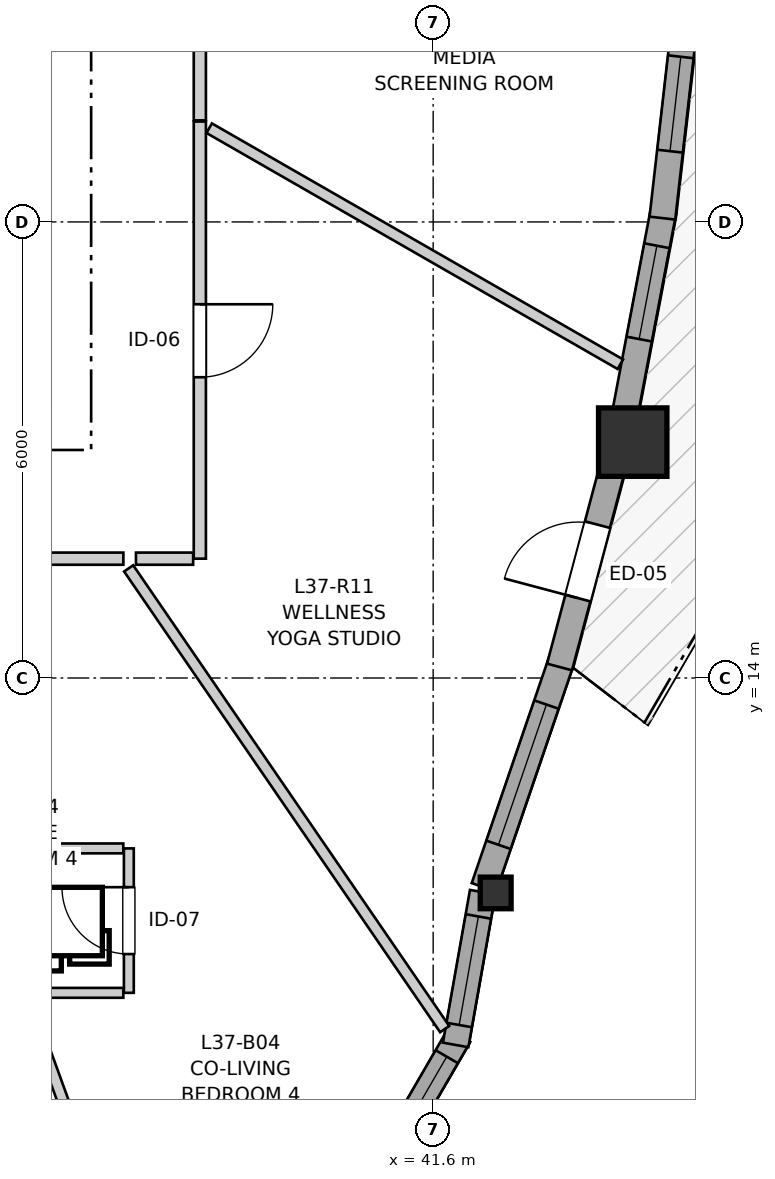
"""IFC4 building model, lengths in metres.
Left out: names, types, materials, properties, quantities, classifications, styles, units other than length and angle.
Written with IfcOpenShell. Run it as: python <this file> out.ifc"""

import sys

from ifc_helpers import new_model, si_unit, direction, frame, frame_2d, origin, origin_2d, place, context, subcontext, project, spatial, rectangle, i_section, extrude, source, transform, mapped, element, fill, save


model = new_model("IFC4")
c1 = context("Model", 3, precision=1e-05, world=origin(), true_north=direction((0.0, 1.0)))
c2 = subcontext(c1, "Body", "Model", "MODEL_VIEW")
j1 = project(units=[si_unit("LENGTHUNIT", "METRE"), si_unit("PLANEANGLEUNIT", "RADIAN")], contexts=[c1])
p1 = place(None, origin())
s1 = spatial("IfcSite", under=j1, at=p1, CompositionType="ELEMENT")
p2 = place(p1, origin())
s2 = spatial("IfcBuilding", under=s1, at=p2, CompositionType="ELEMENT")
p3 = place(p2, frame((0.0, 0.0, 124.8)))
s3 = spatial("IfcBuildingStorey", under=s2, at=p3, CompositionType="ELEMENT", Elevation=124.8)
m1 = source(origin(), c2, "Body", "SweptSolid", [
    extrude(i_section(OverallWidth=0.406, OverallDepth=0.416, WebThickness=0.027, FlangeThickness=0.044, FilletRadius=0.015, at=origin_2d()), origin(), (0.0, 0.0, 1.0), 2.9),
])
p4 = place(p3, frame((42.423, 11.172, 0.0), z_axis=(0.0, 0.0, 1.0), x_axis=(1.0, 0.0, 0.0)))
e1 = element("IfcColumn", 1, at=p4, inside=s3, PredefinedType="PILASTER", context=c2, shape_type="MappedRepresentation", body=[
    mapped(m1, transform((0.0, 0.0, 0.0), x_axis=(1.0, 0.0, 0.0), y_axis=(0.0, 1.0, 0.0), z_axis=(0.0, 0.0, 1.0), scale=1.0)),
])
m2 = source(origin(), c2, "Body", "SweptSolid", [
    extrude(rectangle(XDim=0.9, YDim=0.9, at=origin_2d()), origin(), (0.0, 0.0, 1.0), 2.9),
])
p5 = place(p3, frame((44.226, 17.104, 0.0), z_axis=(0.0, 0.0, 1.0), x_axis=(1.0, 0.0, 0.0)))
e2 = element("IfcColumn", 2, at=p5, inside=s3, PredefinedType="COLUMN", context=c2, shape_type="MappedRepresentation", body=[
    mapped(m2, transform((0.0, 0.0, 0.0), x_axis=(1.0, 0.0, 0.0), y_axis=(0.0, 1.0, 0.0), z_axis=(0.0, 0.0, 1.0), scale=1.0)),
])
p6 = place(p3, frame((40.888, 7.483, 0.0), z_axis=(0.0, 0.0, 1.0), x_axis=(0.501902596059, 0.864924149315, 0.0)))
e3 = element("IfcWall", 3, at=p6, inside=s3, PredefinedType="SOLIDWALL", context=c2, shape_type="SweptSolid", body=[
    extrude(rectangle(XDim=2.099, YDim=0.34, at=frame_2d((1.049, 0.0))), origin(), (0.0, 0.0, 1.0), 2.43),
])
p7 = place(p6, frame((0.324, 0.0, 0.82)))
e4 = element("IfcOpeningElement", 4, at=p7, cuts=e3, PredefinedType="OPENING", context=c2, shape_type="SweptSolid", body=[
    extrude(rectangle(XDim=1.45, YDim=1.25, at=frame_2d((0.725, 0.625))), frame((0.0, 0.18, 0.0), z_axis=(0.0, -1.0, 0.0), x_axis=(1.0, 0.0, 0.0)), (0.0, 0.0, 1.0), 0.36),
])
p8 = place(p3, frame((41.896, 9.173, 0.0), z_axis=(0.0, 0.0, 1.0), x_axis=(0.174399433509, 0.984674990843, 0.0)))
e5 = element("IfcWall", 5, at=p8, inside=s3, PredefinedType="SOLIDWALL", context=c2, shape_type="SweptSolid", body=[
    extrude(rectangle(XDim=2.041, YDim=0.34, at=frame_2d((1.021, 0.0))), origin(), (0.0, 0.0, 1.0), 2.43),
])
p9 = place(p8, frame((0.267, 0.0, 0.82)))
e6 = element("IfcOpeningElement", 6, at=p9, cuts=e5, PredefinedType="OPENING", context=c2, shape_type="SweptSolid", body=[
    extrude(rectangle(XDim=1.45, YDim=1.25, at=frame_2d((0.725, 0.625))), frame((0.0, 0.18, 0.0), z_axis=(0.0, -1.0, 0.0), x_axis=(1.0, 0.0, 0.0)), (0.0, 0.0, 1.0), 0.36),
])
p10 = place(p3, frame((42.268, 11.246, 0.0), z_axis=(0.0, 0.0, 1.0), x_axis=(0.323583674973, 0.946199558915, 0.0)))
e7 = element("IfcWall", 7, at=p10, inside=s3, PredefinedType="SOLIDWALL", context=c2, shape_type="SweptSolid", body=[
    extrude(rectangle(XDim=3.152, YDim=0.34, at=frame_2d((1.576, 0.0))), origin(), (0.0, 0.0, 1.0), 2.43),
])
p11 = place(p10, frame((0.591, 0.0, 0.82)))
e8 = element("IfcOpeningElement", 8, at=p11, cuts=e7, PredefinedType="OPENING", context=c2, shape_type="SweptSolid", body=[
    extrude(rectangle(XDim=1.95, YDim=1.4, at=frame_2d((0.975, 0.7))), frame((0.0, 0.18, 0.0), z_axis=(0.0, -1.0, 0.0), x_axis=(1.0, 0.0, 0.0)), (0.0, 0.0, 1.0), 0.36),
])
p12 = place(p3, frame((43.263, 14.145, 0.0), z_axis=(0.0, 0.0, 1.0), x_axis=(0.257086792151, 0.96638831807, 0.0)))
e9 = element("IfcWall", 9, at=p12, inside=s3, PredefinedType="SOLIDWALL", context=c2, shape_type="SweptSolid", body=[
    extrude(rectangle(XDim=2.876, YDim=0.34, at=frame_2d((1.438, 0.0))), origin(), (0.0, 0.0, 1.0), 2.43),
])
p13 = place(p12, frame((0.938, 0.0, 0.0)))
e10 = element("IfcOpeningElement", 10, at=p13, cuts=e9, PredefinedType="OPENING", context=c2, shape_type="SweptSolid", body=[
    extrude(rectangle(XDim=1.0, YDim=2.1, at=frame_2d((0.5, 1.05))), frame((0.0, 0.18, 0.0), z_axis=(0.0, -1.0, 0.0), x_axis=(1.0, 0.0, 0.0)), (0.0, 0.0, 1.0), 0.36),
])
p14 = place(p3, frame((44.101, 17.361, 0.0), z_axis=(0.0, 0.0, 1.0), x_axis=(0.186739007234, 0.982409559795, 0.0)))
e11 = element("IfcWall", 11, at=p14, inside=s3, PredefinedType="SOLIDWALL", context=c2, shape_type="SweptSolid", body=[
    extrude(rectangle(XDim=2.827, YDim=0.34, at=frame_2d((1.413, 0.0))), origin(), (0.0, 0.0, 1.0), 2.43),
])
p15 = place(p14, frame((1.118, 0.0, 0.82)))
e12 = element("IfcOpeningElement", 12, at=p15, cuts=e11, PredefinedType="OPENING", context=c2, shape_type="SweptSolid", body=[
    extrude(rectangle(XDim=1.25, YDim=1.35, at=frame_2d((0.625, 0.675))), frame((0.0, 0.18, 0.0), z_axis=(0.0, -1.0, 0.0), x_axis=(1.0, 0.0, 0.0)), (0.0, 0.0, 1.0), 0.36),
])
p16 = place(p3, frame((44.616, 20.05, 0.0), z_axis=(0.0, 0.0, 1.0), x_axis=(0.113250801133, 0.993566432627, 0.0)))
e13 = element("IfcWall", 13, at=p16, inside=s3, PredefinedType="SOLIDWALL", context=c2, shape_type="SweptSolid", body=[
    extrude(rectangle(XDim=3.003, YDim=0.34, at=frame_2d((1.501, 0.0))), origin(), (0.0, 0.0, 1.0), 2.43),
])
p17 = place(p16, frame((0.886, 0.0, 0.82)))
e14 = element("IfcOpeningElement", 14, at=p17, cuts=e13, PredefinedType="OPENING", context=c2, shape_type="SweptSolid", body=[
    extrude(rectangle(XDim=1.25, YDim=1.35, at=frame_2d((0.625, 0.675))), frame((0.0, 0.18, 0.0), z_axis=(0.0, -1.0, 0.0), x_axis=(1.0, 0.0, 0.0)), (0.0, 0.0, 1.0), 0.36),
])
p18 = place(p3, frame((38.53, 21.321, 0.0), z_axis=(0.0, 0.0, 1.0), x_axis=(0.0, -1.0, 0.0)))
e15 = element("IfcWall", 15, at=p18, inside=s3, PredefinedType="PARTITIONING", context=c2, shape_type="SweptSolid", body=[
    extrude(rectangle(XDim=5.751, YDim=0.16, at=frame_2d((2.875, 0.0))), origin(), (0.0, 0.0, 1.0), 2.9),
])
p19 = place(p18, frame((2.404, 0.0, 0.0)))
e16 = element("IfcOpeningElement", 16, at=p19, cuts=e15, PredefinedType="OPENING", context=c2, shape_type="SweptSolid", body=[
    extrude(rectangle(XDim=0.96, YDim=2.1, at=frame_2d((0.48, 1.05))), frame((0.0, 0.09, 0.0), z_axis=(0.0, -1.0, 0.0), x_axis=(1.0, 0.0, 0.0)), (0.0, 0.0, 1.0), 0.18),
])
p20 = place(p3, frame((38.53, 26.147, 0.0), z_axis=(0.0, 0.0, 1.0), x_axis=(0.0, -1.0, 0.0)))
e17 = element("IfcWall", 17, at=p20, inside=s3, PredefinedType="PARTITIONING", context=c2, shape_type="SweptSolid", body=[
    extrude(rectangle(XDim=4.811, YDim=0.16, at=frame_2d((2.406, 0.0))), origin(), (0.0, 0.0, 1.0), 2.9),
])
p21 = place(p20, frame((1.949, 0.0, 0.0)))
e18 = element("IfcOpeningElement", 18, at=p21, cuts=e17, PredefinedType="OPENING", context=c2, shape_type="SweptSolid", body=[
    extrude(rectangle(XDim=0.96, YDim=2.1, at=frame_2d((0.48, 1.05))), frame((0.0, 0.09, 0.0), z_axis=(0.0, -1.0, 0.0), x_axis=(1.0, 0.0, 0.0)), (0.0, 0.0, 1.0), 0.18),
])
p22 = place(p3, frame((37.524, 15.57, 0.0), z_axis=(0.0, 0.0, 1.0), x_axis=(-1.0, 0.0, 0.0)))
e19 = element("IfcWall", 19, at=p22, inside=s3, PredefinedType="PARTITIONING", context=c2, shape_type="SweptSolid", body=[
    extrude(rectangle(XDim=3.401, YDim=0.16, at=frame_2d((1.7, 0.0))), origin(), (0.0, 0.0, 1.0), 2.9),
])
p23 = place(p22, frame((1.241, 0.0, 0.0)))
e20 = element("IfcOpeningElement", 20, at=p23, cuts=e19, PredefinedType="OPENING", context=c2, shape_type="SweptSolid", body=[
    extrude(rectangle(XDim=0.92, YDim=2.1, at=frame_2d((0.46, 1.05))), frame((0.0, 0.09, 0.0), z_axis=(0.0, -1.0, 0.0), x_axis=(1.0, 0.0, 0.0)), (0.0, 0.0, 1.0), 0.18),
])
p24 = place(p3, frame((37.596, 9.858, 0.0), z_axis=(0.0, 0.0, 1.0), x_axis=(0.0, 1.0, 0.0)))
e21 = element("IfcWall", 21, at=p24, inside=s3, PredefinedType="PARTITIONING", context=c2, shape_type="SweptSolid", body=[
    extrude(rectangle(XDim=1.9, YDim=0.13, at=frame_2d((0.95, 0.0))), origin(), (0.0, 0.0, 1.0), 2.9),
])
p25 = place(p24, frame((0.51, 0.0, 0.0)))
e22 = element("IfcOpeningElement", 22, at=p25, cuts=e21, PredefinedType="OPENING", context=c2, shape_type="SweptSolid", body=[
    extrude(rectangle(XDim=0.88, YDim=2.05, at=frame_2d((0.44, 1.025))), frame((0.0, 0.075, 0.0), z_axis=(0.0, -1.0, 0.0), x_axis=(1.0, 0.0, 0.0)), (0.0, 0.0, 1.0), 0.15),
])
p26 = place(p3, frame((37.594, 15.442, 0.0), z_axis=(0.0, 0.0, 1.0), x_axis=(0.565681325722, -0.824623937155, 0.0)))
e23 = element("IfcWall", 23, at=p26, inside=s3, PredefinedType="PARTITIONING", context=c2, shape_type="SweptSolid", body=[
    extrude(rectangle(XDim=7.35, YDim=0.145, at=frame_2d((3.675, 0.0))), origin(), (0.0, 0.0, 1.0), 2.9),
])
p27 = place(p3, frame((38.653, 21.233, 0.0), z_axis=(0.0, 0.0, 1.0), x_axis=(0.86726592845, -0.49784516604, 0.0)))
e24 = element("IfcWall", 24, at=p27, inside=s3, PredefinedType="PARTITIONING", context=c2, shape_type="SweptSolid", body=[
    extrude(rectangle(XDim=6.237, YDim=0.145, at=frame_2d((3.119, 0.0))), origin(), (0.0, 0.0, 1.0), 2.9),
])
p28 = place(p3, frame((36.208, 9.873, 0.0), z_axis=(0.0, 0.0, 1.0), x_axis=(0.341362804218, -0.939931612351, 0.0)))
e25 = element("IfcWall", 25, at=p28, inside=s3, PredefinedType="PARTITIONING", context=c2, shape_type="SweptSolid", body=[
    extrude(rectangle(XDim=4.279, YDim=0.145, at=frame_2d((2.14, 0.0))), origin(), (0.0, 0.0, 1.0), 2.9),
])
p29 = place(p3, frame((35.796, 11.758, 0.0), z_axis=(0.0, 0.0, 1.0), x_axis=(1.0, 0.0, 0.0)))
e26 = element("IfcWall", 26, at=p29, inside=s3, PredefinedType="PARTITIONING", context=c2, shape_type="SweptSolid", body=[
    extrude(rectangle(XDim=1.727, YDim=0.13, at=frame_2d((0.864, 0.0))), origin(), (0.0, 0.0, 1.0), 2.9),
])
p30 = place(p3, frame((36.323, 9.858, 0.0), z_axis=(0.0, 0.0, 1.0), x_axis=(1.0, 0.0, 0.0)))
e27 = element("IfcWall", 27, at=p30, inside=s3, PredefinedType="PARTITIONING", context=c2, shape_type="SweptSolid", body=[
    extrude(rectangle(XDim=1.2, YDim=0.13, at=frame_2d((0.6, 0.0))), origin(), (0.0, 0.0, 1.0), 2.9),
])
p31 = place(p3, frame((37.69, 15.57, 0.0), z_axis=(0.0, 0.0, 1.0), x_axis=(1.0, 0.0, 0.0)))
e28 = element("IfcWall", 28, at=p31, inside=s3, PredefinedType="PARTITIONING", context=c2, shape_type="SweptSolid", body=[
    extrude(rectangle(XDim=0.752, YDim=0.16, at=frame_2d((0.376, 0.0))), origin(), (0.0, 0.0, 1.0), 2.9),
])
m3 = source(origin(), c2, "Body", "SweptSolid", [
    extrude(rectangle(XDim=1.45, YDim=1.25, at=frame_2d((0.725, 0.625))), frame((0.0, 0.03, 0.0), z_axis=(0.0, -1.0, 0.0), x_axis=(1.0, 0.0, 0.0)), (0.0, 0.0, 1.0), 0.06),
])
p32 = place(p7, origin())
e29 = element("IfcWindow", 29, at=p32, inside=s3, PartitioningType="SINGLE_PANEL", PredefinedType="WINDOW", context=c2, shape_type="MappedRepresentation", body=[
    mapped(m3, transform((0.0, 0.0, 0.0), x_axis=(1.0, 0.0, 0.0), y_axis=(0.0, 1.0, 0.0), z_axis=(0.0, 0.0, 1.0), scale=1.0)),
])
fill(e4, e29)
p33 = place(p9, origin())
e30 = element("IfcWindow", 30, at=p33, inside=s3, PartitioningType="SINGLE_PANEL", PredefinedType="WINDOW", context=c2, shape_type="MappedRepresentation", body=[
    mapped(m3, transform((0.0, 0.0, 0.0), x_axis=(1.0, 0.0, 0.0), y_axis=(0.0, 1.0, 0.0), z_axis=(0.0, 0.0, 1.0), scale=1.0)),
])
fill(e6, e30)
m4 = source(origin(), c2, "Body", "SweptSolid", [
    extrude(rectangle(XDim=1.95, YDim=1.4, at=frame_2d((0.975, 0.7))), frame((0.0, 0.03, 0.0), z_axis=(0.0, -1.0, 0.0), x_axis=(1.0, 0.0, 0.0)), (0.0, 0.0, 1.0), 0.06),
])
p34 = place(p11, origin())
e31 = element("IfcWindow", 31, at=p34, inside=s3, PartitioningType="SINGLE_PANEL", PredefinedType="WINDOW", context=c2, shape_type="MappedRepresentation", body=[
    mapped(m4, transform((0.0, 0.0, 0.0), x_axis=(1.0, 0.0, 0.0), y_axis=(0.0, 1.0, 0.0), z_axis=(0.0, 0.0, 1.0), scale=1.0)),
])
fill(e8, e31)
m5 = source(origin(), c2, "Body", "SweptSolid", [
    extrude(rectangle(XDim=1.25, YDim=1.35, at=frame_2d((0.625, 0.675))), frame((0.0, 0.03, 0.0), z_axis=(0.0, -1.0, 0.0), x_axis=(1.0, 0.0, 0.0)), (0.0, 0.0, 1.0), 0.06),
])
p35 = place(p15, origin())
e32 = element("IfcWindow", 32, at=p35, inside=s3, PartitioningType="SINGLE_PANEL", PredefinedType="WINDOW", context=c2, shape_type="MappedRepresentation", body=[
    mapped(m5, transform((0.0, 0.0, 0.0), x_axis=(1.0, 0.0, 0.0), y_axis=(0.0, 1.0, 0.0), z_axis=(0.0, 0.0, 1.0), scale=1.0)),
])
fill(e12, e32)
p36 = place(p17, origin())
e33 = element("IfcWindow", 33, at=p36, inside=s3, PartitioningType="SINGLE_PANEL", PredefinedType="WINDOW", context=c2, shape_type="MappedRepresentation", body=[
    mapped(m5, transform((0.0, 0.0, 0.0), x_axis=(1.0, 0.0, 0.0), y_axis=(0.0, 1.0, 0.0), z_axis=(0.0, 0.0, 1.0), scale=1.0)),
])
fill(e14, e33)
m6 = source(origin(), c2, "Body", "SweptSolid", [
    extrude(rectangle(XDim=1.0, YDim=2.1, at=frame_2d((0.5, 1.05))), frame((0.0, 0.025, 0.0), z_axis=(0.0, -1.0, 0.0), x_axis=(1.0, 0.0, 0.0)), (0.0, 0.0, 1.0), 0.05),
])
p37 = place(p13, origin())
e34 = element("IfcDoor", 34, at=p37, inside=s3, OperationType="SINGLE_SWING_LEFT", PredefinedType="DOOR", context=c2, shape_type="MappedRepresentation", body=[
    mapped(m6, transform((0.0, 0.0, 0.0), x_axis=(1.0, 0.0, 0.0), y_axis=(0.0, 1.0, 0.0), z_axis=(0.0, 0.0, 1.0), scale=1.0)),
])
fill(e10, e34)
m7 = source(origin(), c2, "Body", "SweptSolid", [
    extrude(rectangle(XDim=0.96, YDim=2.1, at=frame_2d((0.48, 1.05))), frame((0.0, 0.025, 0.0), z_axis=(0.0, -1.0, 0.0), x_axis=(1.0, 0.0, 0.0)), (0.0, 0.0, 1.0), 0.05),
])
p38 = place(p19, origin())
e35 = element("IfcDoor", 35, at=p38, inside=s3, OperationType="SINGLE_SWING_LEFT", PredefinedType="DOOR", context=c2, shape_type="MappedRepresentation", body=[
    mapped(m7, transform((0.0, 0.0, 0.0), x_axis=(1.0, 0.0, 0.0), y_axis=(0.0, 1.0, 0.0), z_axis=(0.0, 0.0, 1.0), scale=1.0)),
])
fill(e16, e35)
m8 = source(origin(), c2, "Body", "SweptSolid", [
    extrude(rectangle(XDim=0.88, YDim=2.05, at=frame_2d((0.44, 1.025))), frame((0.0, 0.025, 0.0), z_axis=(0.0, -1.0, 0.0), x_axis=(1.0, 0.0, 0.0)), (0.0, 0.0, 1.0), 0.05),
])
p39 = place(p25, origin())
e36 = element("IfcDoor", 36, at=p39, inside=s3, OperationType="SINGLE_SWING_RIGHT", PredefinedType="DOOR", context=c2, shape_type="MappedRepresentation", body=[
    mapped(m8, transform((0.0, 0.0, 0.0), x_axis=(1.0, 0.0, 0.0), y_axis=(0.0, 1.0, 0.0), z_axis=(0.0, 0.0, 1.0), scale=1.0)),
])
fill(e22, e36)
save(model, sys.argv[1])
